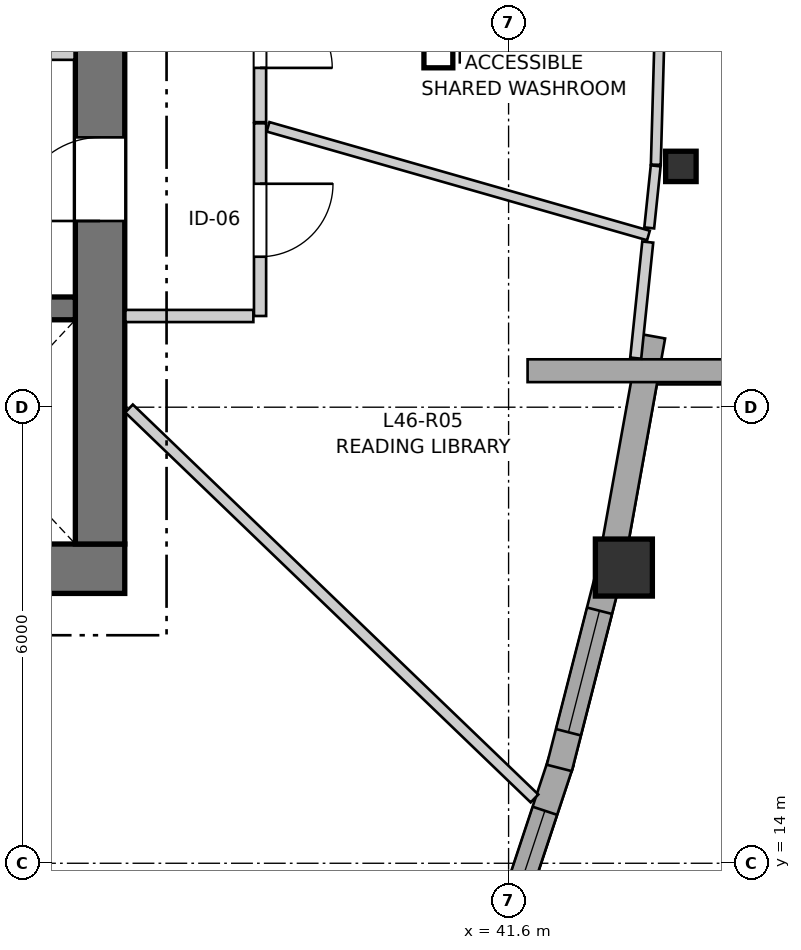
"""IFC4 building model, lengths in metres.
Left out: names, types, materials, properties, quantities, classifications, styles, units other than length and angle.
Written with IfcOpenShell. Run it as: python <this file> out.ifc"""

import sys

from ifc_helpers import new_model, si_unit, direction, frame, frame_2d, origin, origin_2d, place, context, subcontext, project, spatial, rectangle, i_section, extrude, source, transform, mapped, element, fill, save


model = new_model("IFC4")
c1 = context("Model", 3, precision=1e-05, world=origin(), true_north=direction((0.0, 1.0)))
c2 = subcontext(c1, "Body", "Model", "MODEL_VIEW")
j1 = project(units=[si_unit("LENGTHUNIT", "METRE"), si_unit("PLANEANGLEUNIT", "RADIAN")], contexts=[c1])
p1 = place(None, origin())
s1 = spatial("IfcSite", under=j1, at=p1, CompositionType="ELEMENT")
p2 = place(p1, origin())
s2 = spatial("IfcBuilding", under=s1, at=p2, CompositionType="ELEMENT")
p3 = place(p2, frame((0.0, 0.0, 155.4)))
s3 = spatial("IfcBuildingStorey", under=s2, at=p3, CompositionType="ELEMENT", Elevation=155.4)
p4 = place(p3, frame((24.15, 17.875, 0.0), z_axis=(0.0, 0.0, 1.0), x_axis=(1.0, 0.0, 0.0)))
e1 = element("IfcWall", 1, at=p4, inside=s3, PredefinedType="SHEAR", context=c2, shape_type="SweptSolid", body=[
    extrude(rectangle(XDim=12.4, YDim=0.65, at=frame_2d((6.2, 0.0))), origin(), (0.0, 0.0, 1.0), 2.935),
])
p5 = place(p3, frame((36.225, 18.2, 0.0), z_axis=(0.0, 0.0, 1.0), x_axis=(0.0, 1.0, 0.0)))
e2 = element("IfcWall", 2, at=p5, inside=s3, PredefinedType="SHEAR", context=c2, shape_type="SweptSolid", body=[
    extrude(rectangle(XDim=15.6, YDim=0.65, at=frame_2d((7.8, 0.0))), origin(), (0.0, 0.0, 1.0), 2.935),
])
p6 = place(p5, frame((4.25, 0.0, 0.0)))
e3 = element("IfcOpeningElement", 3, at=p6, cuts=e2, PredefinedType="OPENING", context=c2, shape_type="SweptSolid", body=[
    extrude(rectangle(XDim=1.1, YDim=2.15, at=frame_2d((0.55, 1.075))), frame((0.0, 0.335, 0.0), z_axis=(0.0, -1.0, 0.0), x_axis=(1.0, 0.0, 0.0)), (0.0, 0.0, 1.0), 0.67),
])
p7 = place(p5, frame((10.25, 0.0, 0.0)))
e4 = element("IfcOpeningElement", 4, at=p7, cuts=e2, PredefinedType="OPENING", context=c2, shape_type="SweptSolid", body=[
    extrude(rectangle(XDim=1.1, YDim=2.15, at=frame_2d((0.55, 1.075))), frame((0.0, 0.335, 0.0), z_axis=(0.0, -1.0, 0.0), x_axis=(1.0, 0.0, 0.0)), (0.0, 0.0, 1.0), 0.67),
])
p8 = place(p3, frame((24.8, 21.3, 0.0), z_axis=(0.0, 0.0, 1.0), x_axis=(1.0, 0.0, 0.0)))
e5 = element("IfcWall", 5, at=p8, inside=s3, PredefinedType="SHEAR", context=c2, shape_type="SweptSolid", body=[
    extrude(rectangle(XDim=11.1, YDim=0.3, at=frame_2d((5.55, 0.0))), origin(), (0.0, 0.0, 1.0), 2.935),
])
p9 = place(p8, frame((6.22, 0.0, 0.0)))
e6 = element("IfcOpeningElement", 6, at=p9, cuts=e5, PredefinedType="OPENING", context=c2, shape_type="SweptSolid", body=[
    extrude(rectangle(XDim=0.98, YDim=2.15, at=frame_2d((0.49, 1.075))), frame((0.0, 0.16, 0.0), z_axis=(0.0, -1.0, 0.0), x_axis=(1.0, 0.0, 0.0)), (0.0, 0.0, 1.0), 0.32),
])
p10 = place(p8, frame((9.15, 0.0, 0.0)))
e7 = element("IfcOpeningElement", 7, at=p10, cuts=e5, PredefinedType="OPENING", context=c2, shape_type="SweptSolid", body=[
    extrude(rectangle(XDim=1.15, YDim=2.15, at=frame_2d((0.575, 1.075))), frame((0.0, 0.16, 0.0), z_axis=(0.0, -1.0, 0.0), x_axis=(1.0, 0.0, 0.0)), (0.0, 0.0, 1.0), 0.32),
])
m1 = source(origin(), c2, "Body", "SweptSolid", [
    extrude(rectangle(XDim=0.75, YDim=0.75, at=origin_2d()), origin(), (0.0, 0.0, 1.0), 2.935),
])
p11 = place(p3, frame((43.117, 17.89, 0.0), z_axis=(0.0, 0.0, 1.0), x_axis=(1.0, 0.0, 0.0)))
e8 = element("IfcColumn", 8, at=p11, inside=s3, PredefinedType="COLUMN", context=c2, shape_type="MappedRepresentation", body=[
    mapped(m1, transform((0.0, 0.0, 0.0), x_axis=(1.0, 0.0, 0.0), y_axis=(0.0, 1.0, 0.0), z_axis=(0.0, 0.0, 1.0), scale=1.0)),
])
m2 = source(origin(), c2, "Body", "SweptSolid", [
    extrude(i_section(OverallWidth=0.401, OverallDepth=0.399, WebThickness=0.023, FlangeThickness=0.036, FilletRadius=0.015, at=origin_2d()), origin(), (0.0, 0.0, 1.0), 2.935),
])
p12 = place(p3, frame((43.867, 23.168, 0.0), z_axis=(0.0, 0.0, 1.0), x_axis=(1.0, 0.0, 0.0)))
e9 = element("IfcColumn", 9, at=p12, inside=s3, PredefinedType="PILASTER", context=c2, shape_type="MappedRepresentation", body=[
    mapped(m2, transform((0.0, 0.0, 0.0), x_axis=(1.0, 0.0, 0.0), y_axis=(0.0, 1.0, 0.0), z_axis=(0.0, 0.0, 1.0), scale=1.0)),
])
p13 = place(p3, frame((41.411, 12.677, 0.0), z_axis=(0.0, 0.0, 1.0), x_axis=(0.31445026244, 0.949273950159, 0.0)))
e10 = element("IfcWall", 10, at=p13, inside=s3, PredefinedType="SOLIDWALL", context=c2, shape_type="SweptSolid", body=[
    extrude(rectangle(XDim=2.803, YDim=0.34, at=frame_2d((1.401, 0.0))), origin(), (0.0, 0.0, 1.0), 2.515),
])
p14 = place(p13, frame((0.321, 0.0, 0.82)))
e11 = element("IfcOpeningElement", 11, at=p14, cuts=e10, PredefinedType="OPENING", context=c2, shape_type="SweptSolid", body=[
    extrude(rectangle(XDim=1.8, YDim=1.45, at=frame_2d((0.9, 0.725))), frame((0.0, 0.18, 0.0), z_axis=(0.0, -1.0, 0.0), x_axis=(1.0, 0.0, 0.0)), (0.0, 0.0, 1.0), 0.36),
])
p15 = place(p3, frame((42.267, 15.254, 0.0), z_axis=(0.0, 0.0, 1.0), x_axis=(0.247727064013, 0.96882986213, 0.0)))
e12 = element("IfcWall", 12, at=p15, inside=s3, PredefinedType="SOLIDWALL", context=c2, shape_type="SweptSolid", body=[
    extrude(rectangle(XDim=2.61, YDim=0.34, at=frame_2d((1.305, 0.0))), origin(), (0.0, 0.0, 1.0), 2.515),
])
p16 = place(p15, frame((0.485, 0.0, 0.82)))
e13 = element("IfcOpeningElement", 13, at=p16, cuts=e12, PredefinedType="OPENING", context=c2, shape_type="SweptSolid", body=[
    extrude(rectangle(XDim=1.65, YDim=1.45, at=frame_2d((0.825, 0.725))), frame((0.0, 0.18, 0.0), z_axis=(0.0, -1.0, 0.0), x_axis=(1.0, 0.0, 0.0)), (0.0, 0.0, 1.0), 0.36),
])
p17 = place(p3, frame((42.977, 18.073, 0.0), z_axis=(0.0, 0.0, 1.0), x_axis=(0.177185533742, 0.984177467042, 0.0)))
e14 = element("IfcWall", 14, at=p17, inside=s3, PredefinedType="SOLIDWALL", context=c2, shape_type="SweptSolid", body=[
    extrude(rectangle(XDim=2.907, YDim=0.34, at=frame_2d((1.454, 0.0))), origin(), (0.0, 0.0, 1.0), 2.515),
])
p18 = place(p3, frame((41.85, 20.48, 0.0), z_axis=(0.0, 0.0, 1.0), x_axis=(1.0, 0.0, 0.0)))
e15 = element("IfcWall", 15, at=p18, inside=s3, PredefinedType="SOLIDWALL", context=c2, shape_type="SweptSolid", body=[
    extrude(rectangle(XDim=17.423, YDim=0.3, at=frame_2d((8.711, 0.0))), origin(), (0.0, 0.0, 1.0), 2.115),
])
p19 = place(p3, frame((30.67, 24.66, 0.0), z_axis=(0.0, 0.0, 1.0), x_axis=(1.0, 0.0, 0.0)))
e16 = element("IfcWall", 16, at=p19, inside=s3, PredefinedType="PARTITIONING", context=c2, shape_type="SweptSolid", body=[
    extrude(rectangle(XDim=5.22, YDim=0.18, at=frame_2d((2.61, 0.0))), origin(), (0.0, 0.0, 1.0), 2.935),
])
p20 = place(p19, frame((0.68, 0.0, 0.0)))
e17 = element("IfcOpeningElement", 17, at=p20, cuts=e16, PredefinedType="OPENING", context=c2, shape_type="SweptSolid", body=[
    extrude(rectangle(XDim=0.98, YDim=2.15, at=frame_2d((0.49, 1.075))), frame((0.0, 0.1, 0.0), z_axis=(0.0, -1.0, 0.0), x_axis=(1.0, 0.0, 0.0)), (0.0, 0.0, 1.0), 0.2),
])
p21 = place(p3, frame((38.33, 23.735, 0.0), z_axis=(0.0, 0.0, 1.0), x_axis=(0.0, -1.0, 0.0)))
e18 = element("IfcWall", 18, at=p21, inside=s3, PredefinedType="PARTITIONING", context=c2, shape_type="SweptSolid", body=[
    extrude(rectangle(XDim=2.535, YDim=0.16, at=frame_2d((1.268, 0.0))), origin(), (0.0, 0.0, 1.0), 2.935),
])
p22 = place(p21, frame((0.795, 0.0, 0.0)))
e19 = element("IfcOpeningElement", 19, at=p22, cuts=e18, PredefinedType="OPENING", context=c2, shape_type="SweptSolid", body=[
    extrude(rectangle(XDim=0.96, YDim=2.1, at=frame_2d((0.48, 1.05))), frame((0.0, 0.09, 0.0), z_axis=(0.0, -1.0, 0.0), x_axis=(1.0, 0.0, 0.0)), (0.0, 0.0, 1.0), 0.18),
])
p23 = place(p3, frame((38.33, 26.129, 0.0), z_axis=(0.0, 0.0, 1.0), x_axis=(0.0, -1.0, 0.0)))
e20 = element("IfcWall", 20, at=p23, inside=s3, PredefinedType="PARTITIONING", context=c2, shape_type="SweptSolid", body=[
    extrude(rectangle(XDim=2.379, YDim=0.16, at=frame_2d((1.189, 0.0))), origin(), (0.0, 0.0, 1.0), 2.935),
])
p24 = place(p23, frame((0.715, 0.0, 0.0)))
e21 = element("IfcOpeningElement", 21, at=p24, cuts=e20, PredefinedType="OPENING", context=c2, shape_type="SweptSolid", body=[
    extrude(rectangle(XDim=0.95, YDim=2.1, at=frame_2d((0.475, 1.05))), frame((0.0, 0.09, 0.0), z_axis=(0.0, -1.0, 0.0), x_axis=(1.0, 0.0, 0.0)), (0.0, 0.0, 1.0), 0.18),
])
p25 = place(p3, frame((36.606, 19.983, 0.0), z_axis=(0.0, 0.0, 1.0), x_axis=(0.720776649136, -0.69316738387, 0.0)))
e22 = element("IfcWall", 22, at=p25, inside=s3, PredefinedType="PARTITIONING", context=c2, shape_type="SweptSolid", body=[
    extrude(rectangle(XDim=7.401, YDim=0.145, at=frame_2d((3.701, 0.0))), origin(), (0.0, 0.0, 1.0), 2.935),
])
p26 = place(p3, frame((38.436, 23.689, 0.0), z_axis=(0.0, 0.0, 1.0), x_axis=(0.961531027854, -0.274696345942, 0.0)))
e23 = element("IfcWall", 23, at=p26, inside=s3, PredefinedType="PARTITIONING", context=c2, shape_type="SweptSolid", body=[
    extrude(rectangle(XDim=5.205, YDim=0.13, at=frame_2d((2.602, 0.0))), origin(), (0.0, 0.0, 1.0), 2.935),
])
p27 = place(p3, frame((43.537, 23.19, 0.0), z_axis=(0.0, 0.0, 1.0), x_axis=(0.028319632762, 0.999598918767, 0.0)))
e24 = element("IfcWall", 24, at=p27, inside=s3, PredefinedType="PARTITIONING", context=c2, shape_type="SweptSolid", body=[
    extrude(rectangle(XDim=2.612, YDim=0.13, at=frame_2d((1.306, 0.0))), origin(), (0.0, 0.0, 1.0), 2.503),
])
p28 = place(p3, frame((36.558, 21.2, 0.0), z_axis=(0.0, 0.0, 1.0), x_axis=(1.0, 0.0, 0.0)))
e25 = element("IfcWall", 25, at=p28, inside=s3, PredefinedType="PARTITIONING", context=c2, shape_type="SweptSolid", body=[
    extrude(rectangle(XDim=1.684, YDim=0.16, at=frame_2d((0.842, 0.0))), origin(), (0.0, 0.0, 1.0), 2.935),
])
p29 = place(p3, frame((43.273, 20.646, 0.0), z_axis=(0.0, 0.0, 1.0), x_axis=(0.103045636414, 0.99467662927, 0.0)))
e26 = element("IfcWall", 26, at=p29, inside=s3, PredefinedType="PARTITIONING", context=c2, shape_type="SweptSolid", body=[
    extrude(rectangle(XDim=1.535, YDim=0.145, at=frame_2d((0.768, 0.0))), origin(), (0.0, 0.0, 1.0), 2.503),
])
p30 = place(p3, frame((43.45, 22.359, 0.0), z_axis=(0.0, 0.0, 1.0), x_axis=(0.103538633142, 0.994625432737, 0.0)))
e27 = element("IfcWall", 27, at=p30, inside=s3, PredefinedType="PARTITIONING", context=c2, shape_type="SweptSolid", body=[
    extrude(rectangle(XDim=0.821, YDim=0.13, at=frame_2d((0.41, 0.0))), origin(), (0.0, 0.0, 1.0), 2.503),
])
m3 = source(origin(), c2, "Body", "SweptSolid", [
    extrude(rectangle(XDim=1.8, YDim=1.45, at=frame_2d((0.9, 0.725))), frame((0.0, 0.03, 0.0), z_axis=(0.0, -1.0, 0.0), x_axis=(1.0, 0.0, 0.0)), (0.0, 0.0, 1.0), 0.06),
])
p31 = place(p14, origin())
e28 = element("IfcWindow", 28, at=p31, inside=s3, PartitioningType="SINGLE_PANEL", PredefinedType="WINDOW", context=c2, shape_type="MappedRepresentation", body=[
    mapped(m3, transform((0.0, 0.0, 0.0), x_axis=(1.0, 0.0, 0.0), y_axis=(0.0, 1.0, 0.0), z_axis=(0.0, 0.0, 1.0), scale=1.0)),
])
fill(e11, e28)
m4 = source(origin(), c2, "Body", "SweptSolid", [
    extrude(rectangle(XDim=1.65, YDim=1.45, at=frame_2d((0.825, 0.725))), frame((0.0, 0.03, 0.0), z_axis=(0.0, -1.0, 0.0), x_axis=(1.0, 0.0, 0.0)), (0.0, 0.0, 1.0), 0.06),
])
p32 = place(p16, origin())
e29 = element("IfcWindow", 29, at=p32, inside=s3, PartitioningType="SINGLE_PANEL", PredefinedType="WINDOW", context=c2, shape_type="MappedRepresentation", body=[
    mapped(m4, transform((0.0, 0.0, 0.0), x_axis=(1.0, 0.0, 0.0), y_axis=(0.0, 1.0, 0.0), z_axis=(0.0, 0.0, 1.0), scale=1.0)),
])
fill(e13, e29)
m5 = source(origin(), c2, "Body", "SweptSolid", [
    extrude(rectangle(XDim=1.1, YDim=2.15, at=frame_2d((0.55, 1.075))), frame((0.0, 0.025, 0.0), z_axis=(0.0, -1.0, 0.0), x_axis=(1.0, 0.0, 0.0)), (0.0, 0.0, 1.0), 0.05),
])
p33 = place(p6, origin())
e30 = element("IfcDoor", 30, at=p33, inside=s3, OperationType="SINGLE_SWING_LEFT", PredefinedType="DOOR", context=c2, shape_type="MappedRepresentation", body=[
    mapped(m5, transform((0.0, 0.0, 0.0), x_axis=(1.0, 0.0, 0.0), y_axis=(0.0, 1.0, 0.0), z_axis=(0.0, 0.0, 1.0), scale=1.0)),
])
fill(e3, e30)
m6 = source(origin(), c2, "Body", "SweptSolid", [
    extrude(rectangle(XDim=0.96, YDim=2.1, at=frame_2d((0.48, 1.05))), frame((0.0, 0.025, 0.0), z_axis=(0.0, -1.0, 0.0), x_axis=(1.0, 0.0, 0.0)), (0.0, 0.0, 1.0), 0.05),
])
p34 = place(p22, origin())
e31 = element("IfcDoor", 31, at=p34, inside=s3, OperationType="SINGLE_SWING_LEFT", PredefinedType="DOOR", context=c2, shape_type="MappedRepresentation", body=[
    mapped(m6, transform((0.0, 0.0, 0.0), x_axis=(1.0, 0.0, 0.0), y_axis=(0.0, 1.0, 0.0), z_axis=(0.0, 0.0, 1.0), scale=1.0)),
])
fill(e19, e31)
m7 = source(origin(), c2, "Body", "SweptSolid", [
    extrude(rectangle(XDim=0.95, YDim=2.1, at=frame_2d((0.475, 1.05))), frame((0.0, 0.025, 0.0), z_axis=(0.0, -1.0, 0.0), x_axis=(1.0, 0.0, 0.0)), (0.0, 0.0, 1.0), 0.05),
])
p35 = place(p24, origin())
e32 = element("IfcDoor", 32, at=p35, inside=s3, OperationType="SINGLE_SWING_RIGHT", PredefinedType="DOOR", context=c2, shape_type="MappedRepresentation", body=[
    mapped(m7, transform((0.0, 0.0, 0.0), x_axis=(1.0, 0.0, 0.0), y_axis=(0.0, 1.0, 0.0), z_axis=(0.0, 0.0, 1.0), scale=1.0)),
])
fill(e21, e32)
save(model, sys.argv[1])
